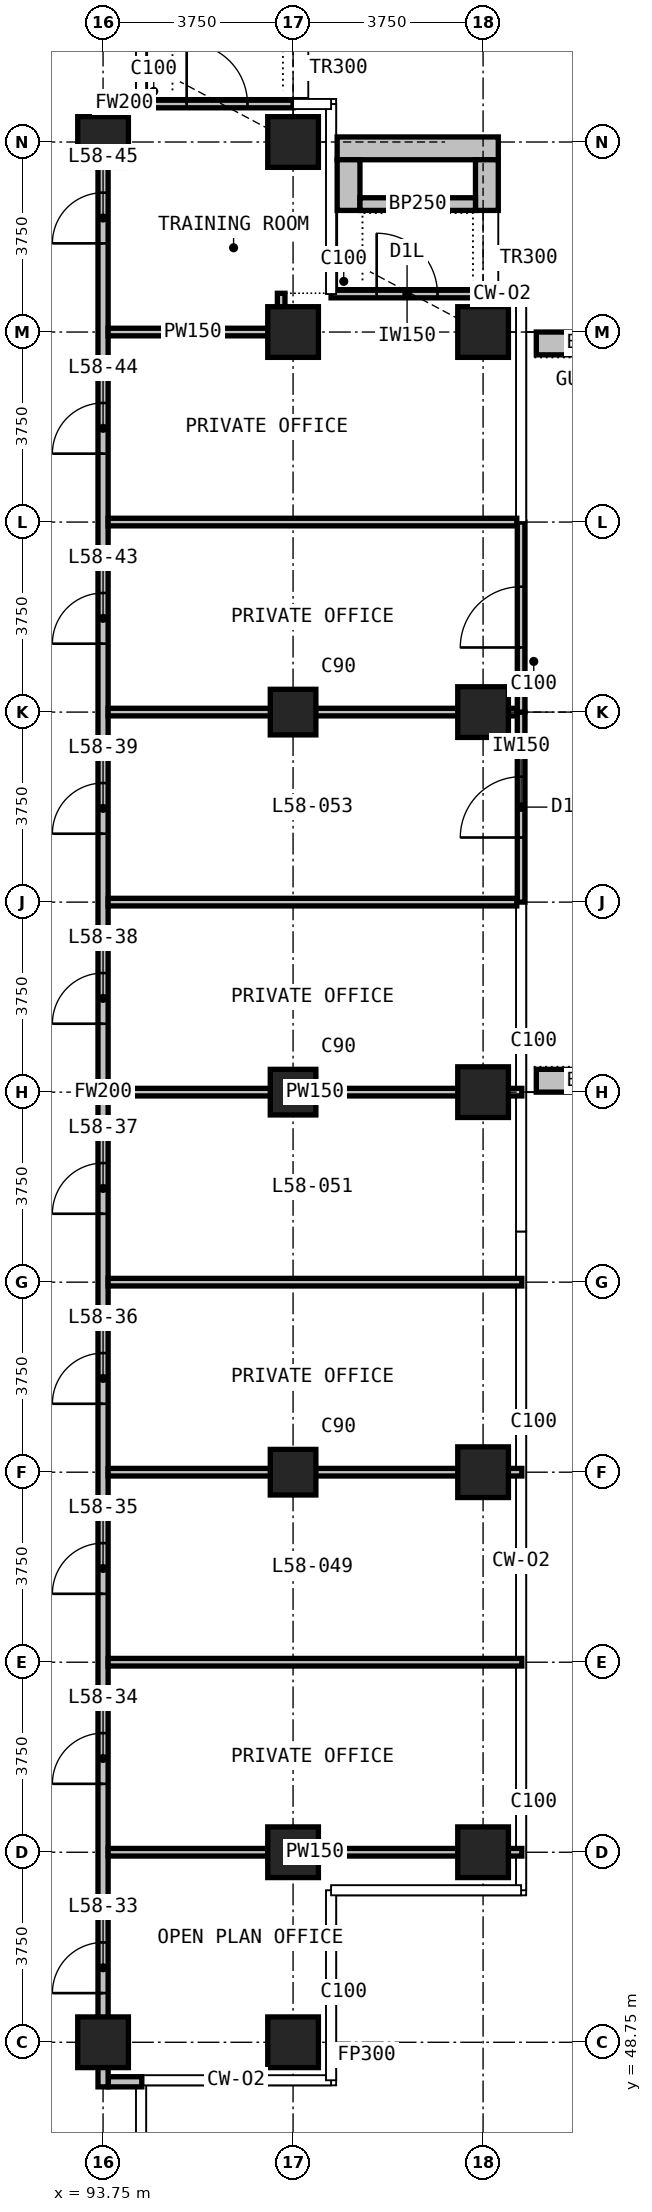
"""IFC4 building model, lengths in metres.
Left out: names, types, materials, properties, quantities, classifications, styles, units other than length and angle.
Written with IfcOpenShell. Run it as: python <this file> out.ifc"""

import sys

from ifc_helpers import new_model, si_unit, direction, frame, frame_2d, origin, origin_2d, place, context, subcontext, project, spatial, rectangle, extrude, element, fill, save


model = new_model("IFC4")
c1 = context("Model", 3, precision=1e-05, world=origin(), true_north=direction((0.0, 1.0)))
c2 = subcontext(c1, "Body", "Model", "MODEL_VIEW")
j1 = project(units=[si_unit("LENGTHUNIT", "METRE"), si_unit("PLANEANGLEUNIT", "RADIAN")], contexts=[c1])
p1 = place(None, origin())
s1 = spatial("IfcSite", under=j1, at=p1, CompositionType="ELEMENT")
p2 = place(p1, origin())
s2 = spatial("IfcBuilding", under=s1, at=p2, CompositionType="ELEMENT")
p3 = place(p2, frame((0.0, 0.0, 224.7)))
s3 = spatial("IfcBuildingStorey", under=s2, at=p3, CompositionType="ELEMENT", Elevation=224.7)
for number, where, z_axis, x_axis in (
    (1, (93.75, 48.75, 0.0), (0.0, 0.0, 1.0), (1.0, 0.0, 0.0)),
    (2, (93.75, 86.25, 0.0), (0.0, 0.0, 1.0), (1.0, 0.0, 0.0)),
    (3, (97.5, 48.75, 0.0), (0.0, 0.0, 1.0), (1.0, 0.0, 0.0)),
    (4, (97.5, 52.5, 0.0), (0.0, 0.0, 1.0), (1.0, 0.0, 0.0)),
):
    element("IfcColumn", number, at=place(p3, frame(where, z_axis=z_axis, x_axis=x_axis)), inside=s3, PredefinedType="COLUMN", context=c2, shape_type="SweptSolid", body=[
        extrude(rectangle(XDim=1.0, YDim=1.0, at=origin_2d()), origin(), (0.0, 0.0, 1.0), 3.6),
    ])
for number, where, z_axis, x_axis in (
    (5, (97.5, 60.0, 0.0), (0.0, 0.0, 1.0), (1.0, 0.0, 0.0)),
    (6, (97.5, 67.5, 0.0), (0.0, 0.0, 1.0), (1.0, 0.0, 0.0)),
    (7, (97.5, 75.0, 0.0), (0.0, 0.0, 1.0), (1.0, 0.0, 0.0)),
):
    element("IfcColumn", number, at=place(p3, frame(where, z_axis=z_axis, x_axis=x_axis)), inside=s3, PredefinedType="COLUMN", context=c2, shape_type="SweptSolid", body=[
        extrude(rectangle(XDim=0.9, YDim=0.9, at=origin_2d()), origin(), (0.0, 0.0, 1.0), 3.6),
    ])
for number, where, z_axis, x_axis in (
    (8, (97.5, 82.5, 0.0), (0.0, 0.0, 1.0), (1.0, 0.0, 0.0)),
    (9, (97.5, 86.25, 0.0), (0.0, 0.0, 1.0), (1.0, 0.0, 0.0)),
    (10, (101.25, 52.5, 0.0), (0.0, 0.0, 1.0), (1.0, 0.0, 0.0)),
    (11, (101.25, 60.0, 0.0), (0.0, 0.0, 1.0), (1.0, 0.0, 0.0)),
    (12, (101.25, 67.5, 0.0), (0.0, 0.0, 1.0), (1.0, 0.0, 0.0)),
    (13, (101.25, 75.0, 0.0), (0.0, 0.0, 1.0), (1.0, 0.0, 0.0)),
    (14, (101.25, 82.5, 0.0), (0.0, 0.0, 1.0), (1.0, 0.0, 0.0)),
):
    element("IfcColumn", number, at=place(p3, frame(where, z_axis=z_axis, x_axis=x_axis)), inside=s3, PredefinedType="COLUMN", context=c2, shape_type="SweptSolid", body=[
        extrude(rectangle(XDim=1.0, YDim=1.0, at=origin_2d()), origin(), (0.0, 0.0, 1.0), 3.6),
    ])
p4 = place(p3, frame((102.0, 71.25, 0.0), z_axis=(0.0, 0.0, 1.0), x_axis=(0.0, 1.0, 0.0)))
e15 = element("IfcWall", 15, at=p4, inside=s3, PredefinedType="SOLIDWALL", context=c2, shape_type="SweptSolid", body=[
    extrude(rectangle(XDim=3.75, YDim=0.15, at=frame_2d((1.875, 0.0))), origin(), (0.0, 0.0, 1.0), 3.3),
])
p5 = place(p4, frame((1.275, 0.0, 0.0)))
e16 = element("IfcOpeningElement", 16, at=p5, cuts=e15, PredefinedType="OPENING", context=c2, shape_type="SweptSolid", body=[
    extrude(rectangle(XDim=1.2, YDim=2.4, at=frame_2d((0.6, 1.2))), frame((0.0, 0.085, 0.0), z_axis=(0.0, -1.0, 0.0), x_axis=(1.0, 0.0, 0.0)), (0.0, 0.0, 1.0), 0.17),
])
p6 = place(p3, frame((102.0, 75.0, 0.0), z_axis=(0.0, 0.0, 1.0), x_axis=(0.0, 1.0, 0.0)))
e17 = element("IfcWall", 17, at=p6, inside=s3, PredefinedType="SOLIDWALL", context=c2, shape_type="SweptSolid", body=[
    extrude(rectangle(XDim=3.75, YDim=0.15, at=frame_2d((1.875, 0.0))), origin(), (0.0, 0.0, 1.0), 3.3),
])
p7 = place(p6, frame((1.275, 0.0, 0.0)))
e18 = element("IfcOpeningElement", 18, at=p7, cuts=e17, PredefinedType="OPENING", context=c2, shape_type="SweptSolid", body=[
    extrude(rectangle(XDim=1.2, YDim=2.4, at=frame_2d((0.6, 1.2))), frame((0.0, 0.085, 0.0), z_axis=(0.0, -1.0, 0.0), x_axis=(1.0, 0.0, 0.0)), (0.0, 0.0, 1.0), 0.17),
])
p8 = place(p3, frame((98.25, 83.25, 0.0), z_axis=(0.0, 0.0, 1.0), x_axis=(1.0, 0.0, 0.0)))
e19 = element("IfcWall", 19, at=p8, inside=s3, PredefinedType="SOLIDWALL", context=c2, shape_type="SweptSolid", body=[
    extrude(rectangle(XDim=3.0, YDim=0.15, at=frame_2d((1.5, 0.0))), origin(), (0.0, 0.0, 1.0), 3.3),
])
p9 = place(p8, frame((0.9, 0.0, 0.0)))
e20 = element("IfcOpeningElement", 20, at=p9, cuts=e19, PredefinedType="OPENING", context=c2, shape_type="SweptSolid", body=[
    extrude(rectangle(XDim=1.2, YDim=2.0, at=frame_2d((0.6, 1.0))), frame((0.0, 0.085, 0.0), z_axis=(0.0, -1.0, 0.0), x_axis=(1.0, 0.0, 0.0)), (0.0, 0.0, 1.0), 0.17),
])
p10 = place(p3, frame((94.5, 87.0, 0.0), z_axis=(0.0, 0.0, 1.0), x_axis=(1.0, 0.0, 0.0)))
e21 = element("IfcWall", 21, at=p10, inside=s3, PredefinedType="SOLIDWALL", context=c2, shape_type="SweptSolid", body=[
    extrude(rectangle(XDim=3.0, YDim=0.15, at=frame_2d((1.5, 0.0))), origin(), (0.0, 0.0, 1.0), 3.3),
])
p11 = place(p10, frame((0.9, 0.0, 0.0)))
e22 = element("IfcOpeningElement", 22, at=p11, cuts=e21, PredefinedType="OPENING", context=c2, shape_type="SweptSolid", body=[
    extrude(rectangle(XDim=1.2, YDim=2.0, at=frame_2d((0.6, 1.0))), frame((0.0, 0.085, 0.0), z_axis=(0.0, -1.0, 0.0), x_axis=(1.0, 0.0, 0.0)), (0.0, 0.0, 1.0), 0.17),
])
for number, where, z_axis, x_axis in (
    (23, (102.3, 67.725, 0.0), (0.0, 0.0, 1.0), (1.0, 0.0, 0.0)),
    (24, (102.3, 82.275, 0.0), (0.0, 0.0, 1.0), (1.0, 0.0, 0.0)),
):
    element("IfcWall", number, at=place(p3, frame(where, z_axis=z_axis, x_axis=x_axis)), inside=s3, PredefinedType="USERDEFINED", context=c2, shape_type="SweptSolid", body=[
        extrude(rectangle(XDim=2.35, YDim=0.45, at=frame_2d((1.175, 0.0))), origin(), (0.0, 0.0, 1.0), 1.1),
    ])
p12 = place(p3, frame((98.37, 86.125, 0.0), z_axis=(0.0, 0.0, 1.0), x_axis=(1.0, 0.0, 0.0)))
e25 = element("IfcWall", 25, at=p12, inside=s3, PredefinedType="USERDEFINED", context=c2, shape_type="SweptSolid", body=[
    extrude(rectangle(XDim=3.18, YDim=0.45, at=frame_2d((1.59, 0.0))), origin(), (0.0, 0.0, 1.0), 1.1),
])
for number, where, z_axis, x_axis in (
    (26, (98.595, 84.9, 0.0), (0.0, 0.0, 1.0), (0.0, 1.0, 0.0)),
    (27, (101.325, 84.9, 0.0), (0.0, 0.0, 1.0), (0.0, 1.0, 0.0)),
):
    element("IfcWall", number, at=place(p3, frame(where, z_axis=z_axis, x_axis=x_axis)), inside=s3, PredefinedType="USERDEFINED", context=c2, shape_type="SweptSolid", body=[
        extrude(rectangle(XDim=1.0, YDim=0.45, at=frame_2d((0.5, 0.0))), origin(), (0.0, 0.0, 1.0), 1.1),
    ])
p13 = place(p3, frame((98.82, 85.025, 0.0), z_axis=(0.0, 0.0, 1.0), x_axis=(1.0, 0.0, 0.0)))
e28 = element("IfcWall", 28, at=p13, inside=s3, PredefinedType="USERDEFINED", context=c2, shape_type="SweptSolid", body=[
    extrude(rectangle(XDim=2.28, YDim=0.25, at=frame_2d((1.14, 0.0))), origin(), (0.0, 0.0, 1.0), 1.0),
])
p14 = place(p3, frame((93.85, 47.97, 0.0), z_axis=(0.0, 0.0, 1.0), x_axis=(1.0, 0.0, 0.0)))
e29 = element("IfcWall", 29, at=p14, inside=s3, PredefinedType="PARTITIONING", context=c2, shape_type="SweptSolid", body=[
    extrude(rectangle(XDim=0.665, YDim=0.2, at=frame_2d((0.333, 0.0))), origin(), (0.0, 0.0, 1.0), 3.3),
])
p15 = place(p3, frame((93.85, 87.03, 0.0), z_axis=(0.0, 0.0, 1.0), x_axis=(1.0, 0.0, 0.0)))
e30 = element("IfcWall", 30, at=p15, inside=s3, PredefinedType="PARTITIONING", context=c2, shape_type="SweptSolid", body=[
    extrude(rectangle(XDim=0.64, YDim=0.2, at=frame_2d((0.32, 0.0))), origin(), (0.0, 0.0, 1.0), 3.3),
])
p16 = place(p3, frame((93.75, 47.87, 0.0), z_axis=(0.0, 0.0, 1.0), x_axis=(0.0, 1.0, 0.0)))
e31 = element("IfcWall", 31, at=p16, inside=s3, PredefinedType="PARTITIONING", context=c2, shape_type="SweptSolid", body=[
    extrude(rectangle(XDim=39.26, YDim=0.2, at=frame_2d((19.63, 0.0))), origin(), (0.0, 0.0, 1.0), 3.3),
])
p17 = place(p16, frame((1.85, 0.0, 0.0)))
e32 = element("IfcOpeningElement", 32, at=p17, cuts=e31, PredefinedType="OPENING", context=c2, shape_type="SweptSolid", body=[
    extrude(rectangle(XDim=1.0, YDim=2.2, at=frame_2d((0.5, 1.1))), frame((0.0, 0.11, 0.0), z_axis=(0.0, -1.0, 0.0), x_axis=(1.0, 0.0, 0.0)), (0.0, 0.0, 1.0), 0.22),
])
p18 = place(p16, frame((5.98, 0.0, 0.0)))
e33 = element("IfcOpeningElement", 33, at=p18, cuts=e31, PredefinedType="OPENING", context=c2, shape_type="SweptSolid", body=[
    extrude(rectangle(XDim=1.0, YDim=2.2, at=frame_2d((0.5, 1.1))), frame((0.0, 0.11, 0.0), z_axis=(0.0, -1.0, 0.0), x_axis=(1.0, 0.0, 0.0)), (0.0, 0.0, 1.0), 0.22),
])
p19 = place(p16, frame((9.73, 0.0, 0.0)))
e34 = element("IfcOpeningElement", 34, at=p19, cuts=e31, PredefinedType="OPENING", context=c2, shape_type="SweptSolid", body=[
    extrude(rectangle(XDim=1.0, YDim=2.2, at=frame_2d((0.5, 1.1))), frame((0.0, 0.11, 0.0), z_axis=(0.0, -1.0, 0.0), x_axis=(1.0, 0.0, 0.0)), (0.0, 0.0, 1.0), 0.22),
])
p20 = place(p16, frame((13.48, 0.0, 0.0)))
e35 = element("IfcOpeningElement", 35, at=p20, cuts=e31, PredefinedType="OPENING", context=c2, shape_type="SweptSolid", body=[
    extrude(rectangle(XDim=1.0, YDim=2.2, at=frame_2d((0.5, 1.1))), frame((0.0, 0.11, 0.0), z_axis=(0.0, -1.0, 0.0), x_axis=(1.0, 0.0, 0.0)), (0.0, 0.0, 1.0), 0.22),
])
p21 = place(p16, frame((17.23, 0.0, 0.0)))
e36 = element("IfcOpeningElement", 36, at=p21, cuts=e31, PredefinedType="OPENING", context=c2, shape_type="SweptSolid", body=[
    extrude(rectangle(XDim=1.0, YDim=2.2, at=frame_2d((0.5, 1.1))), frame((0.0, 0.11, 0.0), z_axis=(0.0, -1.0, 0.0), x_axis=(1.0, 0.0, 0.0)), (0.0, 0.0, 1.0), 0.22),
])
p22 = place(p16, frame((20.98, 0.0, 0.0)))
e37 = element("IfcOpeningElement", 37, at=p22, cuts=e31, PredefinedType="OPENING", context=c2, shape_type="SweptSolid", body=[
    extrude(rectangle(XDim=1.0, YDim=2.2, at=frame_2d((0.5, 1.1))), frame((0.0, 0.11, 0.0), z_axis=(0.0, -1.0, 0.0), x_axis=(1.0, 0.0, 0.0)), (0.0, 0.0, 1.0), 0.22),
])
p23 = place(p16, frame((24.73, 0.0, 0.0)))
e38 = element("IfcOpeningElement", 38, at=p23, cuts=e31, PredefinedType="OPENING", context=c2, shape_type="SweptSolid", body=[
    extrude(rectangle(XDim=1.0, YDim=2.2, at=frame_2d((0.5, 1.1))), frame((0.0, 0.11, 0.0), z_axis=(0.0, -1.0, 0.0), x_axis=(1.0, 0.0, 0.0)), (0.0, 0.0, 1.0), 0.22),
])
p24 = place(p16, frame((28.48, 0.0, 0.0)))
e39 = element("IfcOpeningElement", 39, at=p24, cuts=e31, PredefinedType="OPENING", context=c2, shape_type="SweptSolid", body=[
    extrude(rectangle(XDim=1.0, YDim=2.2, at=frame_2d((0.5, 1.1))), frame((0.0, 0.11, 0.0), z_axis=(0.0, -1.0, 0.0), x_axis=(1.0, 0.0, 0.0)), (0.0, 0.0, 1.0), 0.22),
])
p25 = place(p16, frame((32.23, 0.0, 0.0)))
e40 = element("IfcOpeningElement", 40, at=p25, cuts=e31, PredefinedType="OPENING", context=c2, shape_type="SweptSolid", body=[
    extrude(rectangle(XDim=1.0, YDim=2.2, at=frame_2d((0.5, 1.1))), frame((0.0, 0.11, 0.0), z_axis=(0.0, -1.0, 0.0), x_axis=(1.0, 0.0, 0.0)), (0.0, 0.0, 1.0), 0.22),
])
p26 = place(p16, frame((36.38, 0.0, 0.0)))
e41 = element("IfcOpeningElement", 41, at=p26, cuts=e31, PredefinedType="OPENING", context=c2, shape_type="SweptSolid", body=[
    extrude(rectangle(XDim=1.0, YDim=2.2, at=frame_2d((0.5, 1.1))), frame((0.0, 0.11, 0.0), z_axis=(0.0, -1.0, 0.0), x_axis=(1.0, 0.0, 0.0)), (0.0, 0.0, 1.0), 0.22),
])
for number, where, z_axis, x_axis in (
    (42, (93.85, 52.5, 0.0), (0.0, 0.0, 1.0), (1.0, 0.0, 0.0)),
    (43, (93.85, 56.25, 0.0), (0.0, 0.0, 1.0), (1.0, 0.0, 0.0)),
    (44, (93.85, 60.0, 0.0), (0.0, 0.0, 1.0), (1.0, 0.0, 0.0)),
    (45, (93.85, 63.75, 0.0), (0.0, 0.0, 1.0), (1.0, 0.0, 0.0)),
    (46, (93.85, 67.5, 0.0), (0.0, 0.0, 1.0), (1.0, 0.0, 0.0)),
):
    element("IfcWall", number, at=place(p3, frame(where, z_axis=z_axis, x_axis=x_axis)), inside=s3, PredefinedType="PARTITIONING", context=c2, shape_type="SweptSolid", body=[
        extrude(rectangle(XDim=8.165, YDim=0.15, at=frame_2d((4.083, 0.0))), origin(), (0.0, 0.0, 1.0), 3.3),
    ])
for number, where, z_axis, x_axis in (
    (47, (93.85, 71.25, 0.0), (0.0, 0.0, 1.0), (1.0, 0.0, 0.0)),
    (48, (93.85, 75.0, 0.0), (0.0, 0.0, 1.0), (1.0, 0.0, 0.0)),
    (49, (93.85, 78.75, 0.0), (0.0, 0.0, 1.0), (1.0, 0.0, 0.0)),
):
    element("IfcWall", number, at=place(p3, frame(where, z_axis=z_axis, x_axis=x_axis)), inside=s3, PredefinedType="PARTITIONING", context=c2, shape_type="SweptSolid", body=[
        extrude(rectangle(XDim=8.065, YDim=0.15, at=frame_2d((4.032, 0.0))), origin(), (0.0, 0.0, 1.0), 3.3),
    ])
p27 = place(p3, frame((93.85, 82.5, 0.0), z_axis=(0.0, 0.0, 1.0), x_axis=(1.0, 0.0, 0.0)))
e50 = element("IfcWall", 50, at=p27, inside=s3, PredefinedType="PARTITIONING", context=c2, shape_type="SweptSolid", body=[
    extrude(rectangle(XDim=3.34, YDim=0.15, at=frame_2d((1.67, 0.0))), origin(), (0.0, 0.0, 1.0), 3.3),
])
p28 = place(p3, frame((97.265, 82.425, 0.0), z_axis=(0.0, 0.0, 1.0), x_axis=(0.0, 1.0, 0.0)))
e51 = element("IfcWall", 51, at=p28, inside=s3, PredefinedType="PARTITIONING", context=c2, shape_type="SweptSolid", body=[
    extrude(rectangle(XDim=0.84, YDim=0.15, at=frame_2d((0.42, 0.0))), origin(), (0.0, 0.0, 1.0), 3.3),
])
p29 = place(p5, origin())
e52 = element("IfcDoor", 52, at=p29, inside=s3, OperationType="SINGLE_SWING_LEFT", PredefinedType="DOOR", context=c2, shape_type="SweptSolid", body=[
    extrude(rectangle(XDim=1.2, YDim=2.4, at=frame_2d((0.6, 1.2))), frame((0.0, 0.025, 0.0), z_axis=(0.0, -1.0, 0.0), x_axis=(1.0, 0.0, 0.0)), (0.0, 0.0, 1.0), 0.05),
])
fill(e16, e52)
p30 = place(p7, origin())
e53 = element("IfcDoor", 53, at=p30, inside=s3, OperationType="SINGLE_SWING_LEFT", PredefinedType="DOOR", context=c2, shape_type="SweptSolid", body=[
    extrude(rectangle(XDim=1.2, YDim=2.4, at=frame_2d((0.6, 1.2))), frame((0.0, 0.025, 0.0), z_axis=(0.0, -1.0, 0.0), x_axis=(1.0, 0.0, 0.0)), (0.0, 0.0, 1.0), 0.05),
])
fill(e18, e53)
p31 = place(p9, origin())
e54 = element("IfcDoor", 54, at=p31, inside=s3, OperationType="SINGLE_SWING_LEFT", PredefinedType="DOOR", context=c2, shape_type="SweptSolid", body=[
    extrude(rectangle(XDim=1.2, YDim=2.0, at=frame_2d((0.6, 1.0))), frame((0.0, 0.025, 0.0), z_axis=(0.0, -1.0, 0.0), x_axis=(1.0, 0.0, 0.0)), (0.0, 0.0, 1.0), 0.05),
])
fill(e20, e54)
p32 = place(p11, origin())
e55 = element("IfcDoor", 55, at=p32, inside=s3, OperationType="SINGLE_SWING_LEFT", PredefinedType="DOOR", context=c2, shape_type="SweptSolid", body=[
    extrude(rectangle(XDim=1.2, YDim=2.0, at=frame_2d((0.6, 1.0))), frame((0.0, 0.025, 0.0), z_axis=(0.0, -1.0, 0.0), x_axis=(1.0, 0.0, 0.0)), (0.0, 0.0, 1.0), 0.05),
])
fill(e22, e55)
p33 = place(p17, origin())
e56 = element("IfcDoor", 56, at=p33, inside=s3, OperationType="SINGLE_SWING_RIGHT", PredefinedType="DOOR", context=c2, shape_type="SweptSolid", body=[
    extrude(rectangle(XDim=1.0, YDim=2.2, at=frame_2d((0.5, 1.1))), frame((0.0, 0.025, 0.0), z_axis=(0.0, -1.0, 0.0), x_axis=(1.0, 0.0, 0.0)), (0.0, 0.0, 1.0), 0.05),
])
fill(e32, e56)
p34 = place(p18, origin())
e57 = element("IfcDoor", 57, at=p34, inside=s3, OperationType="SINGLE_SWING_RIGHT", PredefinedType="DOOR", context=c2, shape_type="SweptSolid", body=[
    extrude(rectangle(XDim=1.0, YDim=2.2, at=frame_2d((0.5, 1.1))), frame((0.0, 0.025, 0.0), z_axis=(0.0, -1.0, 0.0), x_axis=(1.0, 0.0, 0.0)), (0.0, 0.0, 1.0), 0.05),
])
fill(e33, e57)
p35 = place(p19, origin())
e58 = element("IfcDoor", 58, at=p35, inside=s3, OperationType="SINGLE_SWING_LEFT", PredefinedType="DOOR", context=c2, shape_type="SweptSolid", body=[
    extrude(rectangle(XDim=1.0, YDim=2.2, at=frame_2d((0.5, 1.1))), frame((0.0, 0.025, 0.0), z_axis=(0.0, -1.0, 0.0), x_axis=(1.0, 0.0, 0.0)), (0.0, 0.0, 1.0), 0.05),
])
fill(e34, e58)
p36 = place(p20, origin())
e59 = element("IfcDoor", 59, at=p36, inside=s3, OperationType="SINGLE_SWING_LEFT", PredefinedType="DOOR", context=c2, shape_type="SweptSolid", body=[
    extrude(rectangle(XDim=1.0, YDim=2.2, at=frame_2d((0.5, 1.1))), frame((0.0, 0.025, 0.0), z_axis=(0.0, -1.0, 0.0), x_axis=(1.0, 0.0, 0.0)), (0.0, 0.0, 1.0), 0.05),
])
fill(e35, e59)
p37 = place(p21, origin())
e60 = element("IfcDoor", 60, at=p37, inside=s3, OperationType="SINGLE_SWING_RIGHT", PredefinedType="DOOR", context=c2, shape_type="SweptSolid", body=[
    extrude(rectangle(XDim=1.0, YDim=2.2, at=frame_2d((0.5, 1.1))), frame((0.0, 0.025, 0.0), z_axis=(0.0, -1.0, 0.0), x_axis=(1.0, 0.0, 0.0)), (0.0, 0.0, 1.0), 0.05),
])
fill(e36, e60)
p38 = place(p22, origin())
e61 = element("IfcDoor", 61, at=p38, inside=s3, OperationType="SINGLE_SWING_LEFT", PredefinedType="DOOR", context=c2, shape_type="SweptSolid", body=[
    extrude(rectangle(XDim=1.0, YDim=2.2, at=frame_2d((0.5, 1.1))), frame((0.0, 0.025, 0.0), z_axis=(0.0, -1.0, 0.0), x_axis=(1.0, 0.0, 0.0)), (0.0, 0.0, 1.0), 0.05),
])
fill(e37, e61)
p39 = place(p23, origin())
e62 = element("IfcDoor", 62, at=p39, inside=s3, OperationType="SINGLE_SWING_RIGHT", PredefinedType="DOOR", context=c2, shape_type="SweptSolid", body=[
    extrude(rectangle(XDim=1.0, YDim=2.2, at=frame_2d((0.5, 1.1))), frame((0.0, 0.025, 0.0), z_axis=(0.0, -1.0, 0.0), x_axis=(1.0, 0.0, 0.0)), (0.0, 0.0, 1.0), 0.05),
])
fill(e38, e62)
p40 = place(p24, origin())
e63 = element("IfcDoor", 63, at=p40, inside=s3, OperationType="SINGLE_SWING_LEFT", PredefinedType="DOOR", context=c2, shape_type="SweptSolid", body=[
    extrude(rectangle(XDim=1.0, YDim=2.2, at=frame_2d((0.5, 1.1))), frame((0.0, 0.025, 0.0), z_axis=(0.0, -1.0, 0.0), x_axis=(1.0, 0.0, 0.0)), (0.0, 0.0, 1.0), 0.05),
])
fill(e39, e63)
p41 = place(p25, origin())
e64 = element("IfcDoor", 64, at=p41, inside=s3, OperationType="SINGLE_SWING_RIGHT", PredefinedType="DOOR", context=c2, shape_type="SweptSolid", body=[
    extrude(rectangle(XDim=1.0, YDim=2.2, at=frame_2d((0.5, 1.1))), frame((0.0, 0.025, 0.0), z_axis=(0.0, -1.0, 0.0), x_axis=(1.0, 0.0, 0.0)), (0.0, 0.0, 1.0), 0.05),
])
fill(e40, e64)
p42 = place(p26, origin())
e65 = element("IfcDoor", 65, at=p42, inside=s3, OperationType="SINGLE_SWING_LEFT", PredefinedType="DOOR", context=c2, shape_type="SweptSolid", body=[
    extrude(rectangle(XDim=1.0, YDim=2.2, at=frame_2d((0.5, 1.1))), frame((0.0, 0.025, 0.0), z_axis=(0.0, -1.0, 0.0), x_axis=(1.0, 0.0, 0.0)), (0.0, 0.0, 1.0), 0.05),
])
fill(e41, e65)
save(model, sys.argv[1])
